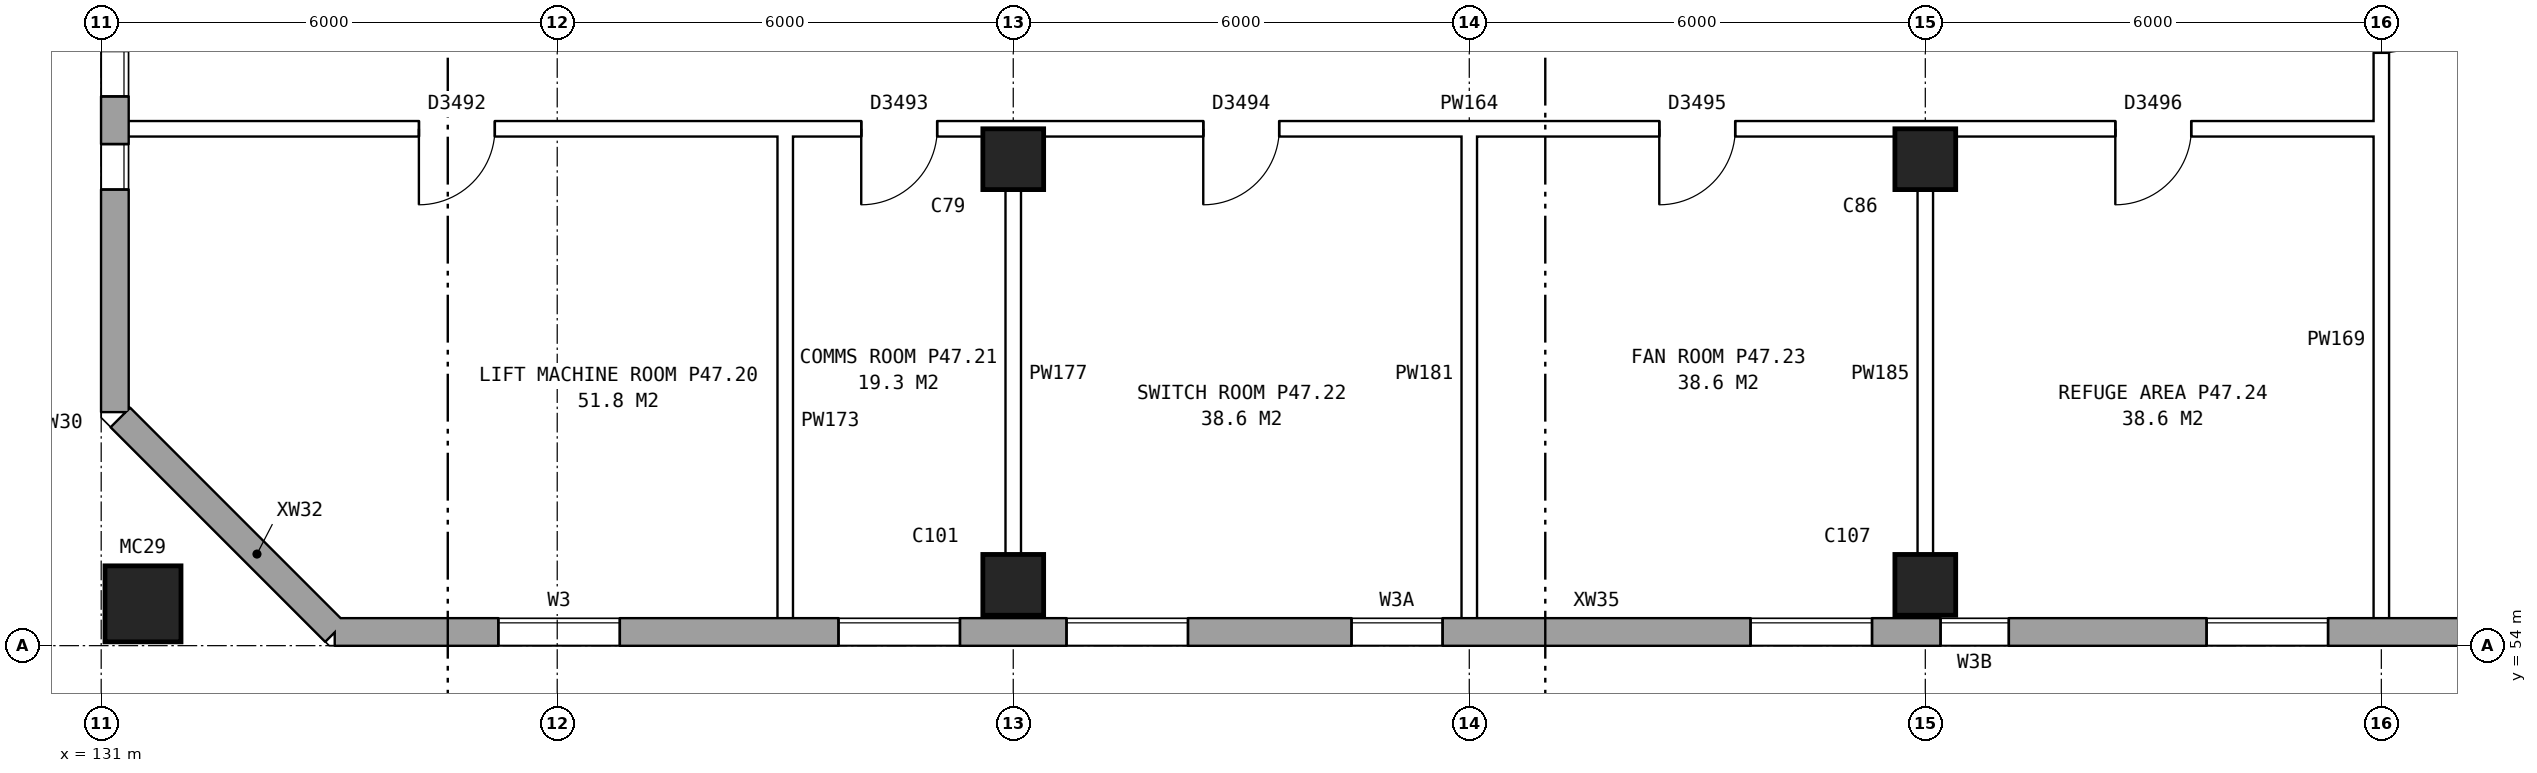
"""IFC4 building model, lengths in metres.
Left out: names, types, materials, properties, quantities, classifications, styles, units other than length and angle.
Written with IfcOpenShell. Run it as: python <this file> out.ifc"""

import sys

from ifc_helpers import new_model, si_unit, direction, frame, frame_2d, origin, origin_2d, place, context, subcontext, project, spatial, rectangle, hollow_rectangle, extrude, element, fill, save


model = new_model("IFC4")
c1 = context("Model", 3, precision=1e-05, world=origin(), true_north=direction((0.0, 1.0)))
c2 = subcontext(c1, "Body", "Model", "MODEL_VIEW")
j1 = project(units=[si_unit("LENGTHUNIT", "METRE"), si_unit("PLANEANGLEUNIT", "RADIAN")], contexts=[c1])
p1 = place(None, origin())
s1 = spatial("IfcSite", under=j1, at=p1, CompositionType="ELEMENT")
p2 = place(p1, origin())
s2 = spatial("IfcBuilding", under=s1, at=p2, CompositionType="ELEMENT")
p3 = place(p2, frame((0.0, 0.0, 167.1)))
s3 = spatial("IfcBuildingStorey", under=s2, at=p3, CompositionType="ELEMENT", Elevation=167.1)
for number, where, z_axis, x_axis in (
    (1, (143.0, 54.8, 0.0), (0.0, 0.0, 1.0), (1.0, 0.0, 0.0)),
    (2, (143.0, 60.4, 0.0), (0.0, 0.0, 1.0), (1.0, 0.0, 0.0)),
    (3, (155.0, 54.8, 0.0), (0.0, 0.0, 1.0), (1.0, 0.0, 0.0)),
    (4, (155.0, 60.4, 0.0), (0.0, 0.0, 1.0), (1.0, 0.0, 0.0)),
):
    element("IfcColumn", number, at=place(p3, frame(where, z_axis=z_axis, x_axis=x_axis)), inside=s3, PredefinedType="COLUMN", context=c2, shape_type="SweptSolid", body=[
        extrude(rectangle(XDim=0.8, YDim=0.8, at=origin_2d()), origin(), (0.0, 0.0, 1.0), 4.2),
    ])
p4 = place(p3, frame((131.55, 54.55, 0.0), z_axis=(0.0, 0.0, 1.0), x_axis=(1.0, 0.0, 0.0)))
e5 = element("IfcColumn", 5, at=p4, inside=s3, PredefinedType="COLUMN", context=c2, shape_type="SweptSolid", body=[
    extrude(hollow_rectangle(XDim=1.0, YDim=1.0, WallThickness=0.055, at=origin_2d()), origin(), (0.0, 0.0, 1.0), 4.5),
])
p5 = place(p3, frame((131.254, 57.001, 0.953), z_axis=(0.0, 0.0, 1.0), x_axis=(0.706994764273, -0.707218780358, 0.0)))
e6 = element("IfcWall", 6, at=p5, inside=s3, PredefinedType="STANDARD", context=c2, shape_type="SweptSolid", body=[
    extrude(rectangle(XDim=1.09, YDim=0.36, at=frame_2d((0.545, 0.0))), origin(), (0.0, 0.0, 1.0), 2.444),
])
p6 = place(p3, frame((132.024, 56.23, 0.0), z_axis=(0.0, 0.0, 1.0), x_axis=(0.707148882153, -0.707064677713, 0.0)))
e7 = element("IfcWall", 7, at=p6, inside=s3, PredefinedType="STANDARD", context=c2, shape_type="SweptSolid", body=[
    extrude(rectangle(XDim=2.899, YDim=0.36, at=frame_2d((1.45, 0.0))), origin(), (0.0, 0.0, 1.0), 4.2),
])
p7 = place(p3, frame((134.075, 54.18, 0.0), z_axis=(0.0, 0.0, 1.0), x_axis=(1.0, 0.0, 0.0)))
e8 = element("IfcWall", 8, at=p7, inside=s3, PredefinedType="STANDARD", context=c2, shape_type="SweptSolid", body=[
    extrude(rectangle(XDim=33.101, YDim=0.36, at=frame_2d((16.55, 0.0))), origin(), (0.0, 0.0, 1.0), 4.2),
])
p8 = place(p7, frame((2.15, 0.0, 1.5)))
e9 = element("IfcOpeningElement", 9, at=p8, cuts=e8, PredefinedType="OPENING", context=c2, shape_type="SweptSolid", body=[
    extrude(rectangle(XDim=1.6, YDim=1.2, at=frame_2d((0.8, 0.6))), frame((0.0, 0.19, 0.0), z_axis=(0.0, -1.0, 0.0), x_axis=(1.0, 0.0, 0.0)), (0.0, 0.0, 1.0), 0.38),
])
p9 = place(p7, frame((6.625, 0.0, 1.5)))
e10 = element("IfcOpeningElement", 10, at=p9, cuts=e8, PredefinedType="OPENING", context=c2, shape_type="SweptSolid", body=[
    extrude(rectangle(XDim=1.6, YDim=1.2, at=frame_2d((0.8, 0.6))), frame((0.0, 0.19, 0.0), z_axis=(0.0, -1.0, 0.0), x_axis=(1.0, 0.0, 0.0)), (0.0, 0.0, 1.0), 0.38),
])
p10 = place(p7, frame((9.625, 0.0, 1.5)))
e11 = element("IfcOpeningElement", 11, at=p10, cuts=e8, PredefinedType="OPENING", context=c2, shape_type="SweptSolid", body=[
    extrude(rectangle(XDim=1.6, YDim=1.2, at=frame_2d((0.8, 0.6))), frame((0.0, 0.19, 0.0), z_axis=(0.0, -1.0, 0.0), x_axis=(1.0, 0.0, 0.0)), (0.0, 0.0, 1.0), 0.38),
])
p11 = place(p7, frame((13.375, 0.0, 1.5)))
e12 = element("IfcOpeningElement", 12, at=p11, cuts=e8, PredefinedType="OPENING", context=c2, shape_type="SweptSolid", body=[
    extrude(rectangle(XDim=1.2, YDim=1.2, at=frame_2d((0.6, 0.6))), frame((0.0, 0.19, 0.0), z_axis=(0.0, -1.0, 0.0), x_axis=(1.0, 0.0, 0.0)), (0.0, 0.0, 1.0), 0.38),
])
p12 = place(p7, frame((18.625, 0.0, 1.5)))
e13 = element("IfcOpeningElement", 13, at=p12, cuts=e8, PredefinedType="OPENING", context=c2, shape_type="SweptSolid", body=[
    extrude(rectangle(XDim=1.6, YDim=1.2, at=frame_2d((0.8, 0.6))), frame((0.0, 0.19, 0.0), z_axis=(0.0, -1.0, 0.0), x_axis=(1.0, 0.0, 0.0)), (0.0, 0.0, 1.0), 0.38),
])
p13 = place(p7, frame((21.125, 0.0, 1.5)))
e14 = element("IfcOpeningElement", 14, at=p13, cuts=e8, PredefinedType="OPENING", context=c2, shape_type="SweptSolid", body=[
    extrude(rectangle(XDim=0.9, YDim=1.2, at=frame_2d((0.45, 0.6))), frame((0.0, 0.19, 0.0), z_axis=(0.0, -1.0, 0.0), x_axis=(1.0, 0.0, 0.0)), (0.0, 0.0, 1.0), 0.38),
])
p14 = place(p7, frame((24.625, 0.0, 1.5)))
e15 = element("IfcOpeningElement", 15, at=p14, cuts=e8, PredefinedType="OPENING", context=c2, shape_type="SweptSolid", body=[
    extrude(rectangle(XDim=1.6, YDim=1.2, at=frame_2d((0.8, 0.6))), frame((0.0, 0.19, 0.0), z_axis=(0.0, -1.0, 0.0), x_axis=(1.0, 0.0, 0.0)), (0.0, 0.0, 1.0), 0.38),
])
p15 = place(p7, frame((29.125, 0.0, 1.5)))
e16 = element("IfcOpeningElement", 16, at=p15, cuts=e8, PredefinedType="OPENING", context=c2, shape_type="SweptSolid", body=[
    extrude(rectangle(XDim=1.2, YDim=1.2, at=frame_2d((0.6, 0.6))), frame((0.0, 0.19, 0.0), z_axis=(0.0, -1.0, 0.0), x_axis=(1.0, 0.0, 0.0)), (0.0, 0.0, 1.0), 0.38),
])
p16 = place(p7, frame((30.625, 0.0, 1.5)))
e17 = element("IfcOpeningElement", 17, at=p16, cuts=e8, PredefinedType="OPENING", context=c2, shape_type="SweptSolid", body=[
    extrude(rectangle(XDim=1.6, YDim=1.2, at=frame_2d((0.8, 0.6))), frame((0.0, 0.19, 0.0), z_axis=(0.0, -1.0, 0.0), x_axis=(1.0, 0.0, 0.0)), (0.0, 0.0, 1.0), 0.38),
])
p17 = place(p3, frame((131.18, 82.925, 0.0), z_axis=(0.0, 0.0, 1.0), x_axis=(0.0, -1.0, 0.0)))
e18 = element("IfcWall", 18, at=p17, inside=s3, PredefinedType="STANDARD", context=c2, shape_type="SweptSolid", body=[
    extrude(rectangle(XDim=25.851, YDim=0.36, at=frame_2d((12.925, 0.0))), origin(), (0.0, 0.0, 1.0), 4.2),
])
p18 = place(p17, frame((2.9, 0.0, 1.5)))
e19 = element("IfcOpeningElement", 19, at=p18, cuts=e18, PredefinedType="OPENING", context=c2, shape_type="SweptSolid", body=[
    extrude(rectangle(XDim=0.6, YDim=1.2, at=frame_2d((0.3, 0.6))), frame((0.0, 0.19, 0.0), z_axis=(0.0, -1.0, 0.0), x_axis=(1.0, 0.0, 0.0)), (0.0, 0.0, 1.0), 0.38),
])
p19 = place(p17, frame((4.625, 0.0, 1.5)))
e20 = element("IfcOpeningElement", 20, at=p19, cuts=e18, PredefinedType="OPENING", context=c2, shape_type="SweptSolid", body=[
    extrude(rectangle(XDim=1.6, YDim=1.2, at=frame_2d((0.8, 0.6))), frame((0.0, 0.19, 0.0), z_axis=(0.0, -1.0, 0.0), x_axis=(1.0, 0.0, 0.0)), (0.0, 0.0, 1.0), 0.38),
])
p20 = place(p17, frame((21.1, 0.0, 1.5)))
e21 = element("IfcOpeningElement", 21, at=p20, cuts=e18, PredefinedType="OPENING", context=c2, shape_type="SweptSolid", body=[
    extrude(rectangle(XDim=0.6, YDim=1.2, at=frame_2d((0.3, 0.6))), frame((0.0, 0.19, 0.0), z_axis=(0.0, -1.0, 0.0), x_axis=(1.0, 0.0, 0.0)), (0.0, 0.0, 1.0), 0.38),
])
p21 = place(p17, frame((22.325, 0.0, 1.5)))
e22 = element("IfcOpeningElement", 22, at=p21, cuts=e18, PredefinedType="OPENING", context=c2, shape_type="SweptSolid", body=[
    extrude(rectangle(XDim=0.6, YDim=1.2, at=frame_2d((0.3, 0.6))), frame((0.0, 0.19, 0.0), z_axis=(0.0, -1.0, 0.0), x_axis=(1.0, 0.0, 0.0)), (0.0, 0.0, 1.0), 0.38),
])
p22 = place(p3, frame((131.24, 60.8, 0.0), z_axis=(0.0, 0.0, 1.0), x_axis=(1.0, 0.0, 0.0)))
e23 = element("IfcWall", 23, at=p22, inside=s3, PredefinedType="PARTITIONING", context=c2, shape_type="SweptSolid", body=[
    extrude(rectangle(XDim=29.86, YDim=0.2, at=frame_2d((14.93, 0.0))), origin(), (0.0, 0.0, 1.0), 4.2),
])
p23 = place(p22, frame((3.94, 0.0, 0.0)))
e24 = element("IfcOpeningElement", 24, at=p23, cuts=e23, PredefinedType="OPENING", context=c2, shape_type="SweptSolid", body=[
    extrude(rectangle(XDim=1.0, YDim=2.1, at=frame_2d((0.5, 1.05))), frame((0.0, 0.11, 0.0), z_axis=(0.0, -1.0, 0.0), x_axis=(1.0, 0.0, 0.0)), (0.0, 0.0, 1.0), 0.22),
])
p24 = place(p22, frame((9.76, 0.0, 0.0)))
e25 = element("IfcOpeningElement", 25, at=p24, cuts=e23, PredefinedType="OPENING", context=c2, shape_type="SweptSolid", body=[
    extrude(rectangle(XDim=1.0, YDim=2.1, at=frame_2d((0.5, 1.05))), frame((0.0, 0.11, 0.0), z_axis=(0.0, -1.0, 0.0), x_axis=(1.0, 0.0, 0.0)), (0.0, 0.0, 1.0), 0.22),
])
p25 = place(p22, frame((14.26, 0.0, 0.0)))
e26 = element("IfcOpeningElement", 26, at=p25, cuts=e23, PredefinedType="OPENING", context=c2, shape_type="SweptSolid", body=[
    extrude(rectangle(XDim=1.0, YDim=2.1, at=frame_2d((0.5, 1.05))), frame((0.0, 0.11, 0.0), z_axis=(0.0, -1.0, 0.0), x_axis=(1.0, 0.0, 0.0)), (0.0, 0.0, 1.0), 0.22),
])
p26 = place(p22, frame((20.26, 0.0, 0.0)))
e27 = element("IfcOpeningElement", 27, at=p26, cuts=e23, PredefinedType="OPENING", context=c2, shape_type="SweptSolid", body=[
    extrude(rectangle(XDim=1.0, YDim=2.1, at=frame_2d((0.5, 1.05))), frame((0.0, 0.11, 0.0), z_axis=(0.0, -1.0, 0.0), x_axis=(1.0, 0.0, 0.0)), (0.0, 0.0, 1.0), 0.22),
])
p27 = place(p22, frame((26.26, 0.0, 0.0)))
e28 = element("IfcOpeningElement", 28, at=p27, cuts=e23, PredefinedType="OPENING", context=c2, shape_type="SweptSolid", body=[
    extrude(rectangle(XDim=1.0, YDim=2.1, at=frame_2d((0.5, 1.05))), frame((0.0, 0.11, 0.0), z_axis=(0.0, -1.0, 0.0), x_axis=(1.0, 0.0, 0.0)), (0.0, 0.0, 1.0), 0.22),
])
for number, where, z_axis, x_axis in (
    (29, (140.0, 54.24, 0.0), (0.0, 0.0, 1.0), (0.0, 1.0, 0.0)),
    (30, (143.0, 54.24, 0.0), (0.0, 0.0, 1.0), (0.0, 1.0, 0.0)),
    (31, (149.0, 54.24, 0.0), (0.0, 0.0, 1.0), (0.0, 1.0, 0.0)),
    (32, (155.0, 54.24, 0.0), (0.0, 0.0, 1.0), (0.0, 1.0, 0.0)),
):
    element("IfcWall", number, at=place(p3, frame(where, z_axis=z_axis, x_axis=x_axis)), inside=s3, PredefinedType="PARTITIONING", context=c2, shape_type="SweptSolid", body=[
        extrude(rectangle(XDim=6.66, YDim=0.2, at=frame_2d((3.33, 0.0))), origin(), (0.0, 0.0, 1.0), 4.2),
    ])
p28 = place(p3, frame((161.0, 54.24, 0.0), z_axis=(0.0, 0.0, 1.0), x_axis=(0.0, 1.0, 0.0)))
e33 = element("IfcWall", 33, at=p28, inside=s3, PredefinedType="PARTITIONING", context=c2, shape_type="SweptSolid", body=[
    extrude(rectangle(XDim=9.56, YDim=0.2, at=frame_2d((4.78, 0.0))), origin(), (0.0, 0.0, 1.0), 4.2),
])
p29 = place(p28, frame((7.559, 0.0, 0.0)))
e34 = element("IfcOpeningElement", 34, at=p29, cuts=e33, PredefinedType="OPENING", context=c2, shape_type="SweptSolid", body=[
    extrude(rectangle(XDim=1.0, YDim=2.1, at=frame_2d((0.5, 1.05))), frame((0.0, 0.11, 0.0), z_axis=(0.0, -1.0, 0.0), x_axis=(1.0, 0.0, 0.0)), (0.0, 0.0, 1.0), 0.22),
])
p30 = place(p8, origin())
e35 = element("IfcWindow", 35, at=p30, inside=s3, PartitioningType="DOUBLE_PANEL_HORIZONTAL", PredefinedType="WINDOW", context=c2, shape_type="SweptSolid", body=[
    extrude(rectangle(XDim=1.6, YDim=1.2, at=frame_2d((0.8, 0.6))), frame((0.0, 0.15, 0.0), z_axis=(0.0, -1.0, 0.0), x_axis=(1.0, 0.0, 0.0)), (0.0, 0.0, 1.0), 0.06),
])
fill(e9, e35)
p31 = place(p9, origin())
e36 = element("IfcWindow", 36, at=p31, inside=s3, PartitioningType="DOUBLE_PANEL_HORIZONTAL", PredefinedType="WINDOW", context=c2, shape_type="SweptSolid", body=[
    extrude(rectangle(XDim=1.6, YDim=1.2, at=frame_2d((0.8, 0.6))), frame((0.0, 0.15, 0.0), z_axis=(0.0, -1.0, 0.0), x_axis=(1.0, 0.0, 0.0)), (0.0, 0.0, 1.0), 0.06),
])
fill(e10, e36)
p32 = place(p10, origin())
e37 = element("IfcWindow", 37, at=p32, inside=s3, PartitioningType="DOUBLE_PANEL_HORIZONTAL", PredefinedType="WINDOW", context=c2, shape_type="SweptSolid", body=[
    extrude(rectangle(XDim=1.6, YDim=1.2, at=frame_2d((0.8, 0.6))), frame((0.0, 0.15, 0.0), z_axis=(0.0, -1.0, 0.0), x_axis=(1.0, 0.0, 0.0)), (0.0, 0.0, 1.0), 0.06),
])
fill(e11, e37)
p33 = place(p11, origin())
e38 = element("IfcWindow", 38, at=p33, inside=s3, PartitioningType="DOUBLE_PANEL_HORIZONTAL", PredefinedType="WINDOW", context=c2, shape_type="SweptSolid", body=[
    extrude(rectangle(XDim=1.2, YDim=1.2, at=frame_2d((0.6, 0.6))), frame((0.0, 0.15, 0.0), z_axis=(0.0, -1.0, 0.0), x_axis=(1.0, 0.0, 0.0)), (0.0, 0.0, 1.0), 0.06),
])
fill(e12, e38)
p34 = place(p12, origin())
e39 = element("IfcWindow", 39, at=p34, inside=s3, PartitioningType="DOUBLE_PANEL_HORIZONTAL", PredefinedType="WINDOW", context=c2, shape_type="SweptSolid", body=[
    extrude(rectangle(XDim=1.6, YDim=1.2, at=frame_2d((0.8, 0.6))), frame((0.0, 0.15, 0.0), z_axis=(0.0, -1.0, 0.0), x_axis=(1.0, 0.0, 0.0)), (0.0, 0.0, 1.0), 0.06),
])
fill(e13, e39)
p35 = place(p13, origin())
e40 = element("IfcWindow", 40, at=p35, inside=s3, PartitioningType="DOUBLE_PANEL_HORIZONTAL", PredefinedType="WINDOW", context=c2, shape_type="SweptSolid", body=[
    extrude(rectangle(XDim=0.9, YDim=1.2, at=frame_2d((0.45, 0.6))), frame((0.0, 0.15, 0.0), z_axis=(0.0, -1.0, 0.0), x_axis=(1.0, 0.0, 0.0)), (0.0, 0.0, 1.0), 0.06),
])
fill(e14, e40)
p36 = place(p14, origin())
e41 = element("IfcWindow", 41, at=p36, inside=s3, PartitioningType="DOUBLE_PANEL_HORIZONTAL", PredefinedType="WINDOW", context=c2, shape_type="SweptSolid", body=[
    extrude(rectangle(XDim=1.6, YDim=1.2, at=frame_2d((0.8, 0.6))), frame((0.0, 0.15, 0.0), z_axis=(0.0, -1.0, 0.0), x_axis=(1.0, 0.0, 0.0)), (0.0, 0.0, 1.0), 0.06),
])
fill(e15, e41)
p37 = place(p20, origin())
e42 = element("IfcWindow", 42, at=p37, inside=s3, PartitioningType="DOUBLE_PANEL_HORIZONTAL", PredefinedType="WINDOW", context=c2, shape_type="SweptSolid", body=[
    extrude(rectangle(XDim=0.6, YDim=1.2, at=frame_2d((0.3, 0.6))), frame((0.0, 0.15, 0.0), z_axis=(0.0, -1.0, 0.0), x_axis=(1.0, 0.0, 0.0)), (0.0, 0.0, 1.0), 0.06),
])
fill(e21, e42)
p38 = place(p21, origin())
e43 = element("IfcWindow", 43, at=p38, inside=s3, PartitioningType="DOUBLE_PANEL_HORIZONTAL", PredefinedType="WINDOW", context=c2, shape_type="SweptSolid", body=[
    extrude(rectangle(XDim=0.6, YDim=1.2, at=frame_2d((0.3, 0.6))), frame((0.0, 0.15, 0.0), z_axis=(0.0, -1.0, 0.0), x_axis=(1.0, 0.0, 0.0)), (0.0, 0.0, 1.0), 0.06),
])
fill(e22, e43)
p39 = place(p23, frame((1.0, 0.0, 0.0), z_axis=(0.0, 0.0, 1.0), x_axis=(-1.0, 0.0, 0.0)))
e44 = element("IfcDoor", 44, at=p39, inside=s3, OperationType="SINGLE_SWING_RIGHT", PredefinedType="DOOR", context=c2, shape_type="SweptSolid", body=[
    extrude(rectangle(XDim=1.0, YDim=2.1, at=frame_2d((0.5, 1.05))), frame((0.0, 0.025, 0.0), z_axis=(0.0, -1.0, 0.0), x_axis=(1.0, 0.0, 0.0)), (0.0, 0.0, 1.0), 0.05),
])
fill(e24, e44)
p40 = place(p24, frame((1.0, 0.0, 0.0), z_axis=(0.0, 0.0, 1.0), x_axis=(-1.0, 0.0, 0.0)))
e45 = element("IfcDoor", 45, at=p40, inside=s3, OperationType="SINGLE_SWING_RIGHT", PredefinedType="DOOR", context=c2, shape_type="SweptSolid", body=[
    extrude(rectangle(XDim=1.0, YDim=2.1, at=frame_2d((0.5, 1.05))), frame((0.0, 0.025, 0.0), z_axis=(0.0, -1.0, 0.0), x_axis=(1.0, 0.0, 0.0)), (0.0, 0.0, 1.0), 0.05),
])
fill(e25, e45)
p41 = place(p25, frame((1.0, 0.0, 0.0), z_axis=(0.0, 0.0, 1.0), x_axis=(-1.0, 0.0, 0.0)))
e46 = element("IfcDoor", 46, at=p41, inside=s3, OperationType="SINGLE_SWING_RIGHT", PredefinedType="DOOR", context=c2, shape_type="SweptSolid", body=[
    extrude(rectangle(XDim=1.0, YDim=2.1, at=frame_2d((0.5, 1.05))), frame((0.0, 0.025, 0.0), z_axis=(0.0, -1.0, 0.0), x_axis=(1.0, 0.0, 0.0)), (0.0, 0.0, 1.0), 0.05),
])
fill(e26, e46)
p42 = place(p26, frame((1.0, 0.0, 0.0), z_axis=(0.0, 0.0, 1.0), x_axis=(-1.0, 0.0, 0.0)))
e47 = element("IfcDoor", 47, at=p42, inside=s3, OperationType="SINGLE_SWING_RIGHT", PredefinedType="DOOR", context=c2, shape_type="SweptSolid", body=[
    extrude(rectangle(XDim=1.0, YDim=2.1, at=frame_2d((0.5, 1.05))), frame((0.0, 0.025, 0.0), z_axis=(0.0, -1.0, 0.0), x_axis=(1.0, 0.0, 0.0)), (0.0, 0.0, 1.0), 0.05),
])
fill(e27, e47)
p43 = place(p27, frame((1.0, 0.0, 0.0), z_axis=(0.0, 0.0, 1.0), x_axis=(-1.0, 0.0, 0.0)))
e48 = element("IfcDoor", 48, at=p43, inside=s3, OperationType="SINGLE_SWING_RIGHT", PredefinedType="DOOR", context=c2, shape_type="SweptSolid", body=[
    extrude(rectangle(XDim=1.0, YDim=2.1, at=frame_2d((0.5, 1.05))), frame((0.0, 0.025, 0.0), z_axis=(0.0, -1.0, 0.0), x_axis=(1.0, 0.0, 0.0)), (0.0, 0.0, 1.0), 0.05),
])
fill(e28, e48)
p44 = place(p29, frame((1.0, 0.0, 0.0), z_axis=(0.0, 0.0, 1.0), x_axis=(-1.0, 0.0, 0.0)))
e49 = element("IfcDoor", 49, at=p44, inside=s3, OperationType="SINGLE_SWING_LEFT", PredefinedType="DOOR", context=c2, shape_type="SweptSolid", body=[
    extrude(rectangle(XDim=1.0, YDim=2.1, at=frame_2d((0.5, 1.05))), frame((0.0, 0.025, 0.0), z_axis=(0.0, -1.0, 0.0), x_axis=(1.0, 0.0, 0.0)), (0.0, 0.0, 1.0), 0.05),
])
fill(e34, e49)
save(model, sys.argv[1])
